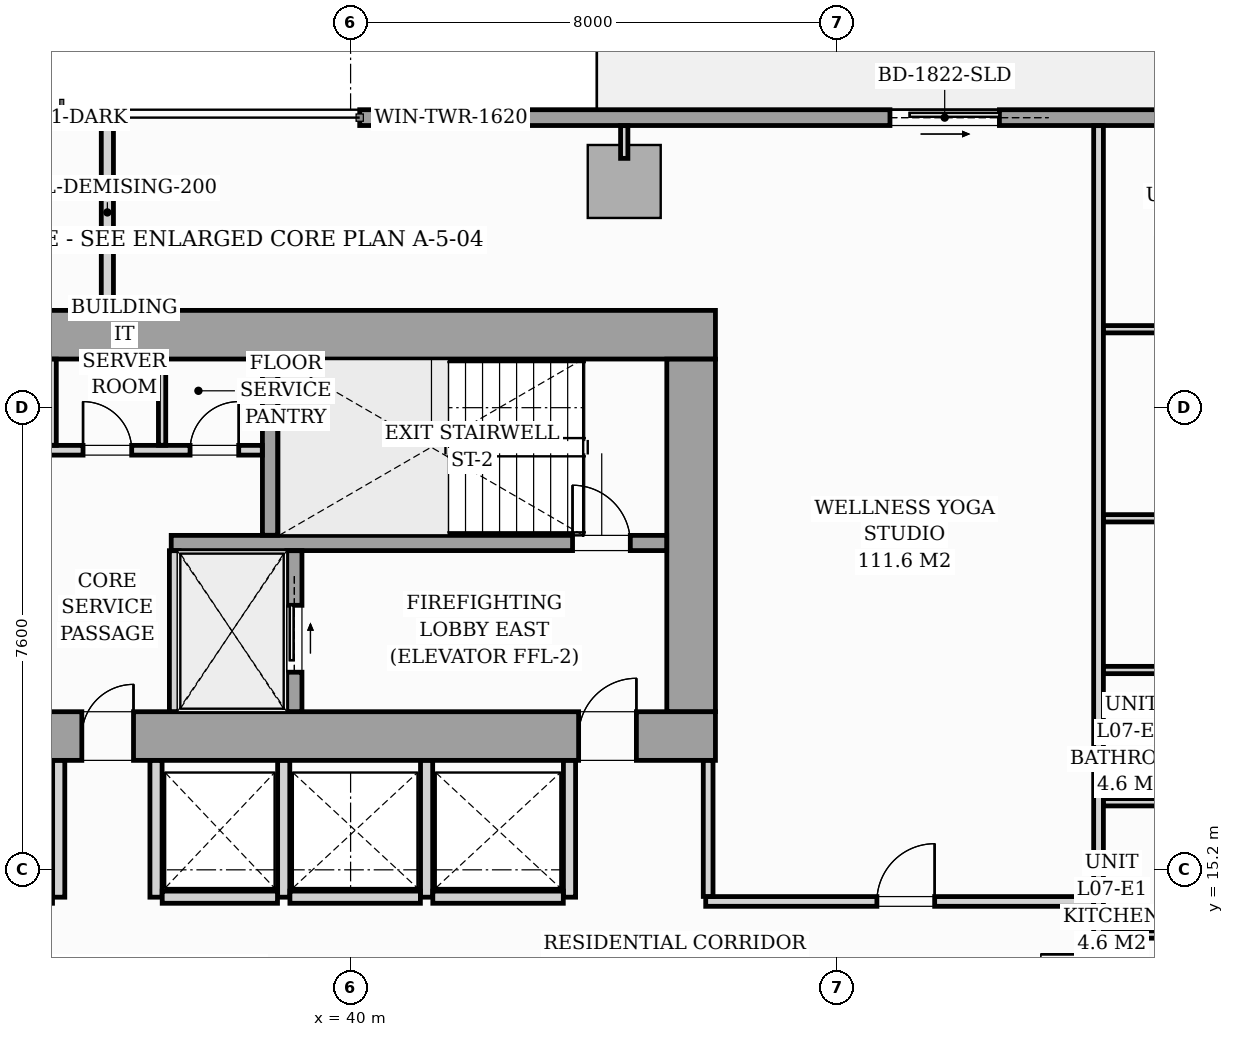
"""IFC4 building model, lengths in metres.
Left out: names, types, materials, properties, quantities, classifications, styles, units other than length and angle.
Written with IfcOpenShell. Run it as: python <this file> out.ifc"""

import sys

from ifc_helpers import new_model, si_unit, direction, frame, frame_2d, origin, origin_2d, place, context, subcontext, project, spatial, rectangle, i_section, extrude, source, transform, mapped, element, fill, save


model = new_model("IFC4")
c1 = context("Model", 3, precision=1e-05, world=origin(), true_north=direction((0.0, 1.0)))
c2 = subcontext(c1, "Body", "Model", "MODEL_VIEW")
j1 = project(units=[si_unit("LENGTHUNIT", "METRE"), si_unit("PLANEANGLEUNIT", "RADIAN")], contexts=[c1])
p1 = place(None, origin())
s1 = spatial("IfcSite", under=j1, at=p1, CompositionType="ELEMENT")
p2 = place(p1, origin())
s2 = spatial("IfcBuilding", under=s1, at=p2, CompositionType="ELEMENT")
p3 = place(p2, frame((0.0, 0.0, 29.4)))
s3 = spatial("IfcBuildingStorey", under=s2, at=p3, CompositionType="ELEMENT", Elevation=29.4)
m1 = source(origin(), c2, "Body", "SweptSolid", [
    extrude(i_section(OverallWidth=0.437, OverallDepth=0.514, WebThickness=0.061, FlangeThickness=0.097, FilletRadius=0.018, at=origin_2d()), origin(), (0.0, 0.0, 1.0), 3.196),
])
for number, where, z_axis, x_axis in (
    (1, (38.88, 17.4, 0.002), (0.0, 0.0, 1.0), (1.0, 0.0, 0.0)),
    (2, (45.6, 17.4, 0.002), (0.0, 0.0, 1.0), (1.0, 0.0, 0.0)),
    (3, (38.88, 24.0, 0.002), (0.0, 0.0, 1.0), (1.0, 0.0, 0.0)),
    (4, (45.6, 24.0, 0.002), (0.0, 0.0, 1.0), (1.0, 0.0, 0.0)),
):
    element("IfcColumn", number, at=place(p3, frame(where, z_axis=z_axis, x_axis=x_axis)), inside=s3, PredefinedType="PILASTER", context=c2, shape_type="MappedRepresentation", body=[
        mapped(m1, transform((0.0, 0.0, 0.0), scale=1.0)),
    ])
m2 = source(origin(), c2, "Body", "SweptSolid", [
    extrude(rectangle(XDim=1.2, YDim=1.2, at=origin_2d()), origin(), (0.0, 0.0, 1.0), 3.196),
])
p4 = place(p3, frame((44.5, 26.52, 0.002), z_axis=(0.0, 0.0, 1.0), x_axis=(1.0, 0.0, 0.0)))
e5 = element("IfcColumn", 5, at=p4, inside=s3, PredefinedType="COLUMN", context=c2, shape_type="MappedRepresentation", body=[
    mapped(m2, transform((0.0, 0.0, 0.0), scale=1.0)),
])
p5 = place(p3, frame((40.15, 27.57, 0.0), z_axis=(0.0, 0.0, 1.0), x_axis=(1.0, 0.0, 0.0)))
e6 = element("IfcWall", 6, at=p5, inside=s3, PredefinedType="STANDARD", context=c2, shape_type="SweptSolid", body=[
    extrude(rectangle(XDim=17.15, YDim=0.26, at=frame_2d((8.575, 0.0))), origin(), (0.0, 0.0, 1.0), 2.94),
])
p6 = place(p5, frame((8.72, 0.0, 0.0)))
e7 = element("IfcOpeningElement", 7, at=p6, cuts=e6, PredefinedType="OPENING", context=c2, shape_type="SweptSolid", body=[
    extrude(rectangle(XDim=1.8, YDim=2.06, at=frame_2d((0.9, 1.03))), frame((0.0, 0.14, 0.0), z_axis=(0.0, -1.0, 0.0), x_axis=(1.0, 0.0, 0.0)), (0.0, 0.0, 1.0), 0.28),
])
p7 = place(p5, frame((0.7, 0.0, 0.65)))
e8 = element("IfcOpeningElement", 8, at=p7, cuts=e6, PredefinedType="OPENING", context=c2, shape_type="SweptSolid", body=[
    extrude(rectangle(XDim=1.6, YDim=1.5, at=frame_2d((0.8, 0.75))), frame((0.0, 0.14, 0.0), z_axis=(0.0, -1.0, 0.0), x_axis=(1.0, 0.0, 0.0)), (0.0, 0.0, 1.0), 0.28),
])
p8 = place(p3, frame((26.0, 17.4, 0.0), z_axis=(0.0, 0.0, 1.0), x_axis=(1.0, 0.0, 0.0)))
e9 = element("IfcWall", 9, at=p8, inside=s3, PredefinedType="SHEAR", context=c2, shape_type="SweptSolid", body=[
    extrude(rectangle(XDim=20.0, YDim=0.8, at=frame_2d((10.0, 0.0))), origin(), (0.0, 0.0, 1.0), 3.2),
])
p9 = place(p8, frame((1.15, 0.0, 0.0)))
e10 = element("IfcOpeningElement", 10, at=p9, cuts=e9, PredefinedType="OPENING", context=c2, shape_type="SweptSolid", body=[
    extrude(rectangle(XDim=0.95, YDim=2.06, at=frame_2d((0.475, 1.03))), frame((0.0, 0.41, 0.0), z_axis=(0.0, -1.0, 0.0), x_axis=(1.0, 0.0, 0.0)), (0.0, 0.0, 1.0), 0.82),
])
p10 = place(p8, frame((9.58, 0.0, 0.0)))
e11 = element("IfcOpeningElement", 11, at=p10, cuts=e9, PredefinedType="OPENING", context=c2, shape_type="SweptSolid", body=[
    extrude(rectangle(XDim=0.85, YDim=2.0, at=frame_2d((0.425, 1.0))), frame((0.0, 0.41, 0.0), z_axis=(0.0, -1.0, 0.0), x_axis=(1.0, 0.0, 0.0)), (0.0, 0.0, 1.0), 0.82),
])
p11 = place(p8, frame((17.75, 0.0, 0.0)))
e12 = element("IfcOpeningElement", 12, at=p11, cuts=e9, PredefinedType="OPENING", context=c2, shape_type="SweptSolid", body=[
    extrude(rectangle(XDim=0.95, YDim=2.06, at=frame_2d((0.475, 1.03))), frame((0.0, 0.41, 0.0), z_axis=(0.0, -1.0, 0.0), x_axis=(1.0, 0.0, 0.0)), (0.0, 0.0, 1.0), 0.82),
])
p12 = place(p3, frame((26.0, 24.0, 0.0), z_axis=(0.0, 0.0, 1.0), x_axis=(1.0, 0.0, 0.0)))
e13 = element("IfcWall", 13, at=p12, inside=s3, PredefinedType="SHEAR", context=c2, shape_type="SweptSolid", body=[
    extrude(rectangle(XDim=20.0, YDim=0.8, at=frame_2d((10.0, 0.0))), origin(), (0.0, 0.0, 1.0), 3.2),
])
p13 = place(p3, frame((45.6, 17.802, 0.0), z_axis=(0.0, 0.0, 1.0), x_axis=(0.0, 1.0, 0.0)))
e14 = element("IfcWall", 14, at=p13, inside=s3, PredefinedType="SHEAR", context=c2, shape_type="SweptSolid", body=[
    extrude(rectangle(XDim=5.796, YDim=0.8, at=frame_2d((2.898, 0.0))), origin(), (0.0, 0.0, 1.0), 3.2),
])
p14 = place(p3, frame((37.05, 20.575, 0.0), z_axis=(0.0, 0.0, 1.0), x_axis=(1.0, 0.0, 0.0)))
e15 = element("IfcWall", 15, at=p14, inside=s3, PredefinedType="SOLIDWALL", context=c2, shape_type="SweptSolid", body=[
    extrude(rectangle(XDim=8.148, YDim=0.25, at=frame_2d((4.074, 0.0))), origin(), (0.0, 0.0, 1.0), 3.2),
])
p15 = place(p14, frame((6.6, 0.0, 0.0)))
e16 = element("IfcOpeningElement", 16, at=p15, cuts=e15, PredefinedType="OPENING", context=c2, shape_type="SweptSolid", body=[
    extrude(rectangle(XDim=0.95, YDim=2.06, at=frame_2d((0.475, 1.03))), frame((0.0, 0.135, 0.0), z_axis=(0.0, -1.0, 0.0), x_axis=(1.0, 0.0, 0.0)), (0.0, 0.0, 1.0), 0.27),
])
p16 = place(p3, frame((38.675, 20.702, 0.0), z_axis=(0.0, 0.0, 1.0), x_axis=(0.0, 1.0, 0.0)))
e17 = element("IfcWall", 17, at=p16, inside=s3, PredefinedType="SOLIDWALL", context=c2, shape_type="SweptSolid", body=[
    extrude(rectangle(XDim=2.896, YDim=0.25, at=frame_2d((1.448, 0.0))), origin(), (0.0, 0.0, 1.0), 3.2),
])
p17 = place(p3, frame((37.1, 17.802, 0.0), z_axis=(0.0, 0.0, 1.0), x_axis=(0.0, 1.0, 0.0)))
e18 = element("IfcWall", 18, at=p17, inside=s3, PredefinedType="PARTITIONING", context=c2, shape_type="SweptSolid", body=[
    extrude(rectangle(XDim=2.646, YDim=0.16, at=frame_2d((1.323, 0.0))), origin(), (0.0, 0.0, 1.0), 2.94),
])
p18 = place(p3, frame((39.075, 17.802, 0.0), z_axis=(0.0, 0.0, 1.0), x_axis=(0.0, 1.0, 0.0)))
e19 = element("IfcWall", 19, at=p18, inside=s3, PredefinedType="SOLIDWALL", context=c2, shape_type="SweptSolid", body=[
    extrude(rectangle(XDim=2.646, YDim=0.25, at=frame_2d((1.323, 0.0))), origin(), (0.0, 0.0, 1.0), 3.2),
])
p19 = place(p18, frame((0.648, 0.0, 0.0)))
e20 = element("IfcOpeningElement", 20, at=p19, cuts=e19, PredefinedType="OPENING", context=c2, shape_type="SweptSolid", body=[
    extrude(rectangle(XDim=1.1, YDim=2.08, at=frame_2d((0.55, 1.04))), frame((0.0, 0.135, 0.0), z_axis=(0.0, -1.0, 0.0), x_axis=(1.0, 0.0, 0.0)), (0.0, 0.0, 1.0), 0.27),
])
p20 = place(p3, frame((33.452, 22.1, 0.0), z_axis=(0.0, 0.0, 1.0), x_axis=(1.0, 0.0, 0.0)))
e21 = element("IfcWall", 21, at=p20, inside=s3, PredefinedType="PARTITIONING", context=c2, shape_type="SweptSolid", body=[
    extrude(rectangle(XDim=5.096, YDim=0.16, at=frame_2d((2.548, 0.0))), origin(), (0.0, 0.0, 1.0), 2.94),
])
p21 = place(p20, frame((0.388, 0.0, 0.0)))
e22 = element("IfcOpeningElement", 22, at=p21, cuts=e21, PredefinedType="OPENING", context=c2, shape_type="SweptSolid", body=[
    extrude(rectangle(XDim=0.8, YDim=2.05, at=frame_2d((0.4, 1.025))), frame((0.0, 0.09, 0.0), z_axis=(0.0, -1.0, 0.0), x_axis=(1.0, 0.0, 0.0)), (0.0, 0.0, 1.0), 0.18),
])
p22 = place(p20, frame((2.148, 0.0, 0.0)))
e23 = element("IfcOpeningElement", 23, at=p22, cuts=e21, PredefinedType="OPENING", context=c2, shape_type="SweptSolid", body=[
    extrude(rectangle(XDim=0.8, YDim=2.05, at=frame_2d((0.4, 1.025))), frame((0.0, 0.09, 0.0), z_axis=(0.0, -1.0, 0.0), x_axis=(1.0, 0.0, 0.0)), (0.0, 0.0, 1.0), 0.18),
])
p23 = place(p20, frame((3.908, 0.0, 0.0)))
e24 = element("IfcOpeningElement", 24, at=p23, cuts=e21, PredefinedType="OPENING", context=c2, shape_type="SweptSolid", body=[
    extrude(rectangle(XDim=0.8, YDim=2.05, at=frame_2d((0.4, 1.025))), frame((0.0, 0.09, 0.0), z_axis=(0.0, -1.0, 0.0), x_axis=(1.0, 0.0, 0.0)), (0.0, 0.0, 1.0), 0.18),
])
for number, where, z_axis, x_axis in (
    (25, (35.1, 22.182, 0.0), (0.0, 0.0, 1.0), (0.0, 1.0, 0.0)),
    (26, (36.9, 22.182, 0.0), (0.0, 0.0, 1.0), (0.0, 1.0, 0.0)),
):
    element("IfcWall", number, at=place(p3, frame(where, z_axis=z_axis, x_axis=x_axis)), inside=s3, PredefinedType="PARTITIONING", context=c2, shape_type="SweptSolid", body=[
        extrude(rectangle(XDim=1.416, YDim=0.12, at=frame_2d((0.708, 0.0))), origin(), (0.0, 0.0, 1.0), 2.94),
    ])
for number, where, z_axis, x_axis in (
    (27, (35.2, 14.75, 0.0), (0.0, 0.0, 1.0), (0.0, 1.0, 0.0)),
    (28, (36.8, 14.75, 0.0), (0.0, 0.0, 1.0), (0.0, 1.0, 0.0)),
    (29, (38.9, 14.75, 0.0), (0.0, 0.0, 1.0), (0.0, 1.0, 0.0)),
):
    element("IfcWall", number, at=place(p3, frame(where, z_axis=z_axis, x_axis=x_axis)), inside=s3, PredefinedType="PARTITIONING", context=c2, shape_type="SweptSolid", body=[
        extrude(rectangle(XDim=2.248, YDim=0.2, at=frame_2d((1.124, 0.0))), origin(), (0.0, 0.0, 1.0), 2.94),
    ])
p24 = place(p3, frame((36.902, 14.75, 0.0), z_axis=(0.0, 0.0, 1.0), x_axis=(1.0, 0.0, 0.0)))
e30 = element("IfcWall", 30, at=p24, inside=s3, PredefinedType="PARTITIONING", context=c2, shape_type="SweptSolid", body=[
    extrude(rectangle(XDim=1.896, YDim=0.2, at=frame_2d((0.948, 0.0))), origin(), (0.0, 0.0, 1.0), 2.94),
])
for number, where, z_axis, x_axis in (
    (31, (41.25, 14.75, 0.0), (0.0, 0.0, 1.0), (0.0, 1.0, 0.0)),
    (32, (43.6, 14.75, 0.0), (0.0, 0.0, 1.0), (0.0, 1.0, 0.0)),
):
    element("IfcWall", number, at=place(p3, frame(where, z_axis=z_axis, x_axis=x_axis)), inside=s3, PredefinedType="PARTITIONING", context=c2, shape_type="SweptSolid", body=[
        extrude(rectangle(XDim=2.248, YDim=0.2, at=frame_2d((1.124, 0.0))), origin(), (0.0, 0.0, 1.0), 2.94),
    ])
for number, where, z_axis, x_axis in (
    (33, (39.002, 14.75, 0.0), (0.0, 0.0, 1.0), (1.0, 0.0, 0.0)),
    (34, (41.352, 14.75, 0.0), (0.0, 0.0, 1.0), (1.0, 0.0, 0.0)),
):
    element("IfcWall", number, at=place(p3, frame(where, z_axis=z_axis, x_axis=x_axis)), inside=s3, PredefinedType="PARTITIONING", context=c2, shape_type="SweptSolid", body=[
        extrude(rectangle(XDim=2.146, YDim=0.2, at=frame_2d((1.073, 0.0))), origin(), (0.0, 0.0, 1.0), 2.94),
    ])
p25 = place(p3, frame((52.3, 12.432, 0.0), z_axis=(0.0, 0.0, 1.0), x_axis=(0.0, 1.0, 0.0)))
e35 = element("IfcWall", 35, at=p25, inside=s3, PredefinedType="PARTITIONING", context=c2, shape_type="SweptSolid", body=[
    extrude(rectangle(XDim=15.006, YDim=0.16, at=frame_2d((7.503, 0.0))), origin(), (0.0, 0.0, 1.0), 2.94),
])
p26 = place(p25, frame((0.429, 0.0, 0.0)))
e36 = element("IfcOpeningElement", 36, at=p26, cuts=e35, PredefinedType="OPENING", context=c2, shape_type="SweptSolid", body=[
    extrude(rectangle(XDim=0.95, YDim=2.06, at=frame_2d((0.475, 1.03))), frame((0.0, 0.09, 0.0), z_axis=(0.0, -1.0, 0.0), x_axis=(1.0, 0.0, 0.0)), (0.0, 0.0, 1.0), 0.18),
])
p27 = place(p3, frame((36.0, 24.402, 0.0), z_axis=(0.0, 0.0, 1.0), x_axis=(0.0, 1.0, 0.0)))
e37 = element("IfcWall", 37, at=p27, inside=s3, PredefinedType="PARTITIONING", context=c2, shape_type="SweptSolid", body=[
    extrude(rectangle(XDim=3.218, YDim=0.2, at=frame_2d((1.609, 0.0))), origin(), (0.0, 0.0, 1.0), 2.94),
])
p28 = place(p3, frame((52.382, 16.311, 0.0), z_axis=(0.0, 0.0, 1.0), x_axis=(1.0, 0.0, 0.0)))
e38 = element("IfcWall", 38, at=p28, inside=s3, PredefinedType="PARTITIONING", context=c2, shape_type="SweptSolid", body=[
    extrude(rectangle(XDim=2.256, YDim=0.12, at=frame_2d((1.128, 0.0))), origin(), (0.0, 0.0, 1.0), 2.045),
])
for number, where, z_axis, x_axis in (
    (39, (52.382, 14.136, 0.0), (0.0, 0.0, 1.0), (1.0, 0.0, 0.0)),
    (40, (52.382, 18.486, 0.0), (0.0, 0.0, 1.0), (1.0, 0.0, 0.0)),
):
    element("IfcWall", number, at=place(p3, frame(where, z_axis=z_axis, x_axis=x_axis)), inside=s3, PredefinedType="PARTITIONING", context=c2, shape_type="SweptSolid", body=[
        extrude(rectangle(XDim=2.256, YDim=0.12, at=frame_2d((1.128, 0.0))), origin(), (0.0, 0.0, 1.0), 2.94),
    ])
p29 = place(p3, frame((52.382, 24.09, 0.0), z_axis=(0.0, 0.0, 1.0), x_axis=(1.0, 0.0, 0.0)))
e41 = element("IfcWall", 41, at=p29, inside=s3, PredefinedType="PARTITIONING", context=c2, shape_type="SweptSolid", body=[
    extrude(rectangle(XDim=7.338, YDim=0.12, at=frame_2d((3.669, 0.0))), origin(), (0.0, 0.0, 1.0), 2.94),
])
p30 = place(p29, frame((3.253, 0.0, 0.0)))
e42 = element("IfcOpeningElement", 42, at=p30, cuts=e41, PredefinedType="OPENING", context=c2, shape_type="SweptSolid", body=[
    extrude(rectangle(XDim=0.85, YDim=2.05, at=frame_2d((0.425, 1.025))), frame((0.0, 0.07, 0.0), z_axis=(0.0, -1.0, 0.0), x_axis=(1.0, 0.0, 0.0)), (0.0, 0.0, 1.0), 0.14),
])
p31 = place(p3, frame((52.382, 20.981, 0.0), z_axis=(0.0, 0.0, 1.0), x_axis=(1.0, 0.0, 0.0)))
e43 = element("IfcWall", 43, at=p31, inside=s3, PredefinedType="PARTITIONING", context=c2, shape_type="SweptSolid", body=[
    extrude(rectangle(XDim=7.338, YDim=0.12, at=frame_2d((3.669, 0.0))), origin(), (0.0, 0.0, 1.0), 2.94),
])
p32 = place(p31, frame((3.253, 0.0, 0.0)))
e44 = element("IfcOpeningElement", 44, at=p32, cuts=e43, PredefinedType="OPENING", context=c2, shape_type="SweptSolid", body=[
    extrude(rectangle(XDim=0.85, YDim=2.05, at=frame_2d((0.425, 1.025))), frame((0.0, 0.07, 0.0), z_axis=(0.0, -1.0, 0.0), x_axis=(1.0, 0.0, 0.0)), (0.0, 0.0, 1.0), 0.14),
])
p33 = place(p3, frame((45.84, 14.68, 0.0), z_axis=(0.0, 0.0, 1.0), x_axis=(1.0, 0.0, 0.0)))
e45 = element("IfcWall", 45, at=p33, inside=s3, PredefinedType="PARTITIONING", context=c2, shape_type="SweptSolid", body=[
    extrude(rectangle(XDim=6.378, YDim=0.16, at=frame_2d((3.189, 0.0))), origin(), (0.0, 0.0, 1.0), 2.94),
])
p34 = place(p33, frame((2.815, 0.0, 0.0)))
e46 = element("IfcOpeningElement", 46, at=p34, cuts=e45, PredefinedType="OPENING", context=c2, shape_type="SweptSolid", body=[
    extrude(rectangle(XDim=0.95, YDim=2.06, at=frame_2d((0.475, 1.03))), frame((0.0, 0.09, 0.0), z_axis=(0.0, -1.0, 0.0), x_axis=(1.0, 0.0, 0.0)), (0.0, 0.0, 1.0), 0.18),
])
p35 = place(p3, frame((45.88, 14.762, 0.0), z_axis=(0.0, 0.0, 1.0), x_axis=(0.0, 1.0, 0.0)))
e47 = element("IfcWall", 47, at=p35, inside=s3, PredefinedType="PARTITIONING", context=c2, shape_type="SweptSolid", body=[
    extrude(rectangle(XDim=2.236, YDim=0.16, at=frame_2d((1.118, 0.0))), origin(), (0.0, 0.0, 1.0), 2.94),
])
p36 = place(p3, frame((44.5, 26.9, 0.0), z_axis=(0.0, 0.0, 1.0), x_axis=(0.0, 1.0, 0.0)))
e48 = element("IfcWall", 48, at=p36, inside=s3, PredefinedType="PARTITIONING", context=c2, shape_type="SweptSolid", body=[
    extrude(rectangle(XDim=0.538, YDim=0.12, at=frame_2d((0.269, 0.0))), origin(), (0.0, 0.0, 1.0), 2.94),
])
m3 = source(origin(), c2, "Body", "SweptSolid", [
    extrude(rectangle(XDim=1.8, YDim=2.06, at=frame_2d((0.9, 1.03))), frame((0.0, 0.025, 0.0), z_axis=(0.0, -1.0, 0.0), x_axis=(1.0, 0.0, 0.0)), (0.0, 0.0, 1.0), 0.05),
])
p37 = place(p6, origin())
e49 = element("IfcDoor", 49, at=p37, inside=s3, OperationType="SLIDING_TO_RIGHT", PredefinedType="DOOR", context=c2, shape_type="MappedRepresentation", body=[
    mapped(m3, transform((0.0, 0.0, 0.0), scale=1.0)),
])
fill(e7, e49)
m4 = source(origin(), c2, "Body", "SweptSolid", [
    extrude(rectangle(XDim=1.6, YDim=1.5, at=frame_2d((0.8, 0.75))), frame((0.0, 0.03, 0.0), z_axis=(0.0, -1.0, 0.0), x_axis=(1.0, 0.0, 0.0)), (0.0, 0.0, 1.0), 0.06),
])
p38 = place(p7, origin())
e50 = element("IfcWindow", 50, at=p38, inside=s3, PartitioningType="SINGLE_PANEL", PredefinedType="WINDOW", context=c2, shape_type="MappedRepresentation", body=[
    mapped(m4, transform((0.0, 0.0, 0.0), scale=1.0)),
])
fill(e8, e50)
m5 = source(origin(), c2, "Body", "SweptSolid", [
    extrude(rectangle(XDim=0.85, YDim=2.0, at=frame_2d((0.425, 1.0))), frame((0.0, 0.025, 0.0), z_axis=(0.0, -1.0, 0.0), x_axis=(1.0, 0.0, 0.0)), (0.0, 0.0, 1.0), 0.05),
])
p39 = place(p10, origin())
e51 = element("IfcDoor", 51, at=p39, inside=s3, OperationType="SINGLE_SWING_RIGHT", PredefinedType="DOOR", context=c2, shape_type="MappedRepresentation", body=[
    mapped(m5, transform((0.0, 0.0, 0.0), scale=1.0)),
])
fill(e11, e51)
m6 = source(origin(), c2, "Body", "SweptSolid", [
    extrude(rectangle(XDim=0.95, YDim=2.06, at=frame_2d((0.475, 1.03))), frame((0.0, 0.025, 0.0), z_axis=(0.0, -1.0, 0.0), x_axis=(1.0, 0.0, 0.0)), (0.0, 0.0, 1.0), 0.05),
])
p40 = place(p11, origin())
e52 = element("IfcDoor", 52, at=p40, inside=s3, OperationType="SINGLE_SWING_RIGHT", PredefinedType="DOOR", context=c2, shape_type="MappedRepresentation", body=[
    mapped(m6, transform((0.0, 0.0, 0.0), scale=1.0)),
])
fill(e12, e52)
p41 = place(p15, origin())
e53 = element("IfcDoor", 53, at=p41, inside=s3, OperationType="SINGLE_SWING_LEFT", PredefinedType="DOOR", context=c2, shape_type="MappedRepresentation", body=[
    mapped(m6, transform((0.0, 0.0, 0.0), scale=1.0)),
])
fill(e16, e53)
m7 = source(origin(), c2, "Body", "SweptSolid", [
    extrude(rectangle(XDim=1.1, YDim=2.08, at=frame_2d((0.55, 1.04))), frame((0.0, 0.025, 0.0), z_axis=(0.0, -1.0, 0.0), x_axis=(1.0, 0.0, 0.0)), (0.0, 0.0, 1.0), 0.05),
])
p42 = place(p19, origin())
e54 = element("IfcDoor", 54, at=p42, inside=s3, OperationType="SLIDING_TO_RIGHT", PredefinedType="DOOR", context=c2, shape_type="MappedRepresentation", body=[
    mapped(m7, transform((0.0, 0.0, 0.0), scale=1.0)),
])
fill(e20, e54)
m8 = source(origin(), c2, "Body", "SweptSolid", [
    extrude(rectangle(XDim=0.8, YDim=2.05, at=frame_2d((0.4, 1.025))), frame((0.0, 0.025, 0.0), z_axis=(0.0, -1.0, 0.0), x_axis=(1.0, 0.0, 0.0)), (0.0, 0.0, 1.0), 0.05),
])
p43 = place(p22, origin())
e55 = element("IfcDoor", 55, at=p43, inside=s3, OperationType="SINGLE_SWING_LEFT", PredefinedType="DOOR", context=c2, shape_type="MappedRepresentation", body=[
    mapped(m8, transform((0.0, 0.0, 0.0), scale=1.0)),
])
fill(e23, e55)
p44 = place(p23, origin())
e56 = element("IfcDoor", 56, at=p44, inside=s3, OperationType="SINGLE_SWING_RIGHT", PredefinedType="DOOR", context=c2, shape_type="MappedRepresentation", body=[
    mapped(m8, transform((0.0, 0.0, 0.0), scale=1.0)),
])
fill(e24, e56)
m9 = source(origin(), c2, "Body", "SweptSolid", [
    extrude(rectangle(XDim=0.95, YDim=2.06, at=frame_2d((0.475, 1.03))), frame((0.0, 0.025, 0.0), z_axis=(0.0, -1.0, 0.0), x_axis=(1.0, 0.0, 0.0)), (0.0, 0.0, 1.0), 0.05),
])
p45 = place(p26, origin())
e57 = element("IfcDoor", 57, at=p45, inside=s3, OperationType="SINGLE_SWING_RIGHT", PredefinedType="DOOR", context=c2, shape_type="MappedRepresentation", body=[
    mapped(m9, transform((0.0, 0.0, 0.0), scale=1.0)),
])
fill(e36, e57)
p46 = place(p34, origin())
e58 = element("IfcDoor", 58, at=p46, inside=s3, OperationType="SINGLE_SWING_RIGHT", PredefinedType="DOOR", context=c2, shape_type="MappedRepresentation", body=[
    mapped(m9, transform((0.0, 0.0, 0.0), scale=1.0)),
])
fill(e46, e58)
save(model, sys.argv[1])
